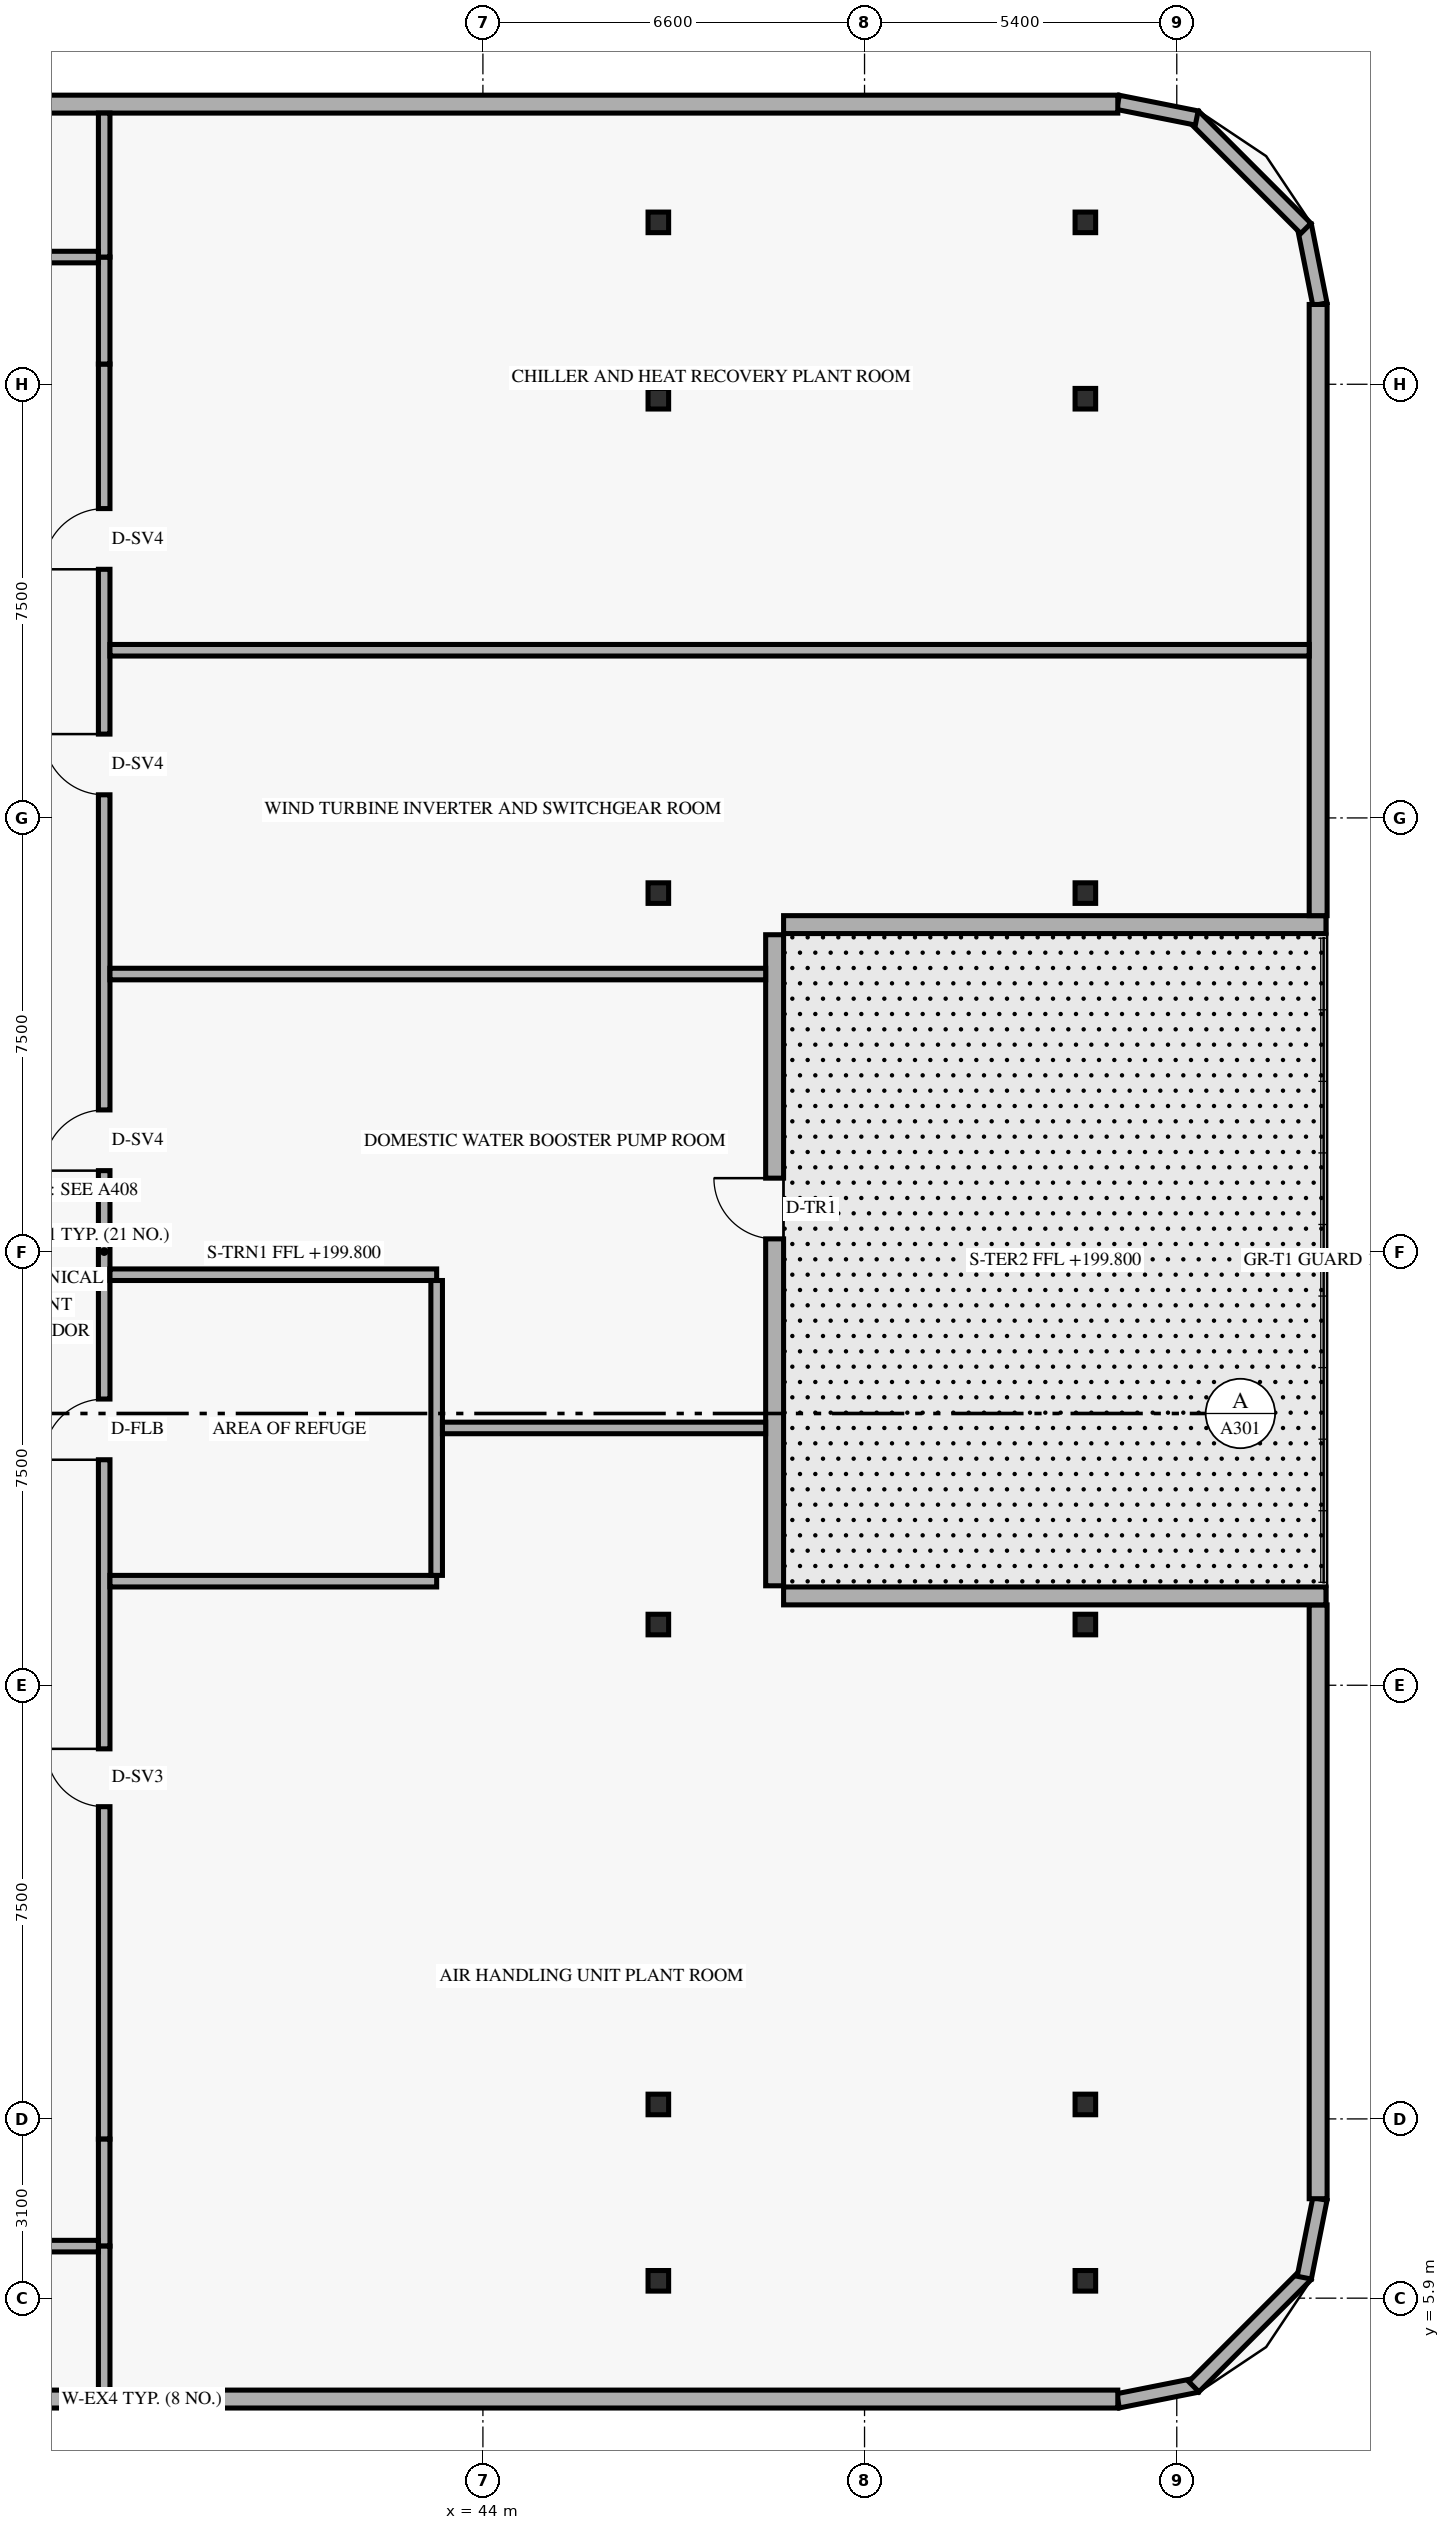
"""IFC4 building model, lengths in metres.
Left out: names, types, materials, properties, quantities, classifications, styles, units other than length and angle.
Written with IfcOpenShell. Run it as: python <this file> out.ifc"""

import sys

from ifc_helpers import new_model, si_unit, direction, frame, frame_2d, origin, origin_2d, place, context, subcontext, project, spatial, rectangle, hollow_rectangle, extrude, element, fill, save


model = new_model("IFC4")
c1 = context("Model", 3, precision=1e-05, world=origin(), true_north=direction((0.0, 1.0)))
c2 = subcontext(c1, "Body", "Model", "MODEL_VIEW")
j1 = project(units=[si_unit("LENGTHUNIT", "METRE"), si_unit("PLANEANGLEUNIT", "RADIAN")], contexts=[c1])
p1 = place(None, origin())
s1 = spatial("IfcSite", under=j1, at=p1, CompositionType="ELEMENT")
p2 = place(p1, origin())
s2 = spatial("IfcBuilding", under=s1, at=p2, CompositionType="ELEMENT")
p3 = place(p2, frame((0.0, 0.0, 199.8)))
s3 = spatial("IfcBuildingStorey", under=s2, at=p3, CompositionType="ELEMENT", Elevation=199.8)
for number, where, z_axis, x_axis in (
    (1, (46.929, 6.2, 0.0), (0.035, 0.0, 0.999), (0.0, 1.0, 0.0)),
    (2, (46.929, 9.25, 0.0), (0.035, 0.0, 0.999), (0.0, 1.0, 0.0)),
    (3, (46.929, 17.55, 0.0), (0.035, 0.0, 0.999), (0.0, 1.0, 0.0)),
    (4, (46.929, 30.2, 0.0), (0.035, 0.0, 0.999), (0.0, 1.0, 0.0)),
    (5, (46.929, 38.75, 0.0), (0.035, 0.0, 0.999), (0.0, 1.0, 0.0)),
    (6, (46.929, 41.8, 0.0), (0.035, 0.0, 0.999), (0.0, 1.0, 0.0)),
):
    element("IfcColumn", number, at=place(p3, frame(where, z_axis=z_axis, x_axis=x_axis)), inside=s3, PredefinedType="COLUMN", context=c2, shape_type="SweptSolid", body=[
        extrude(hollow_rectangle(XDim=0.356, YDim=0.356, WallThickness=0.016, at=origin_2d()), origin(), (0.0, 0.0, 1.0), 6.004),
    ])
for number, where, z_axis, x_axis in (
    (7, (54.245, 6.2, 0.0), (0.058, 0.0, 0.998), (0.0, 1.0, 0.0)),
    (8, (54.245, 9.25, 0.0), (0.058, 0.0, 0.998), (0.0, 1.0, 0.0)),
    (9, (54.245, 17.55, 0.0), (0.058, 0.0, 0.998), (0.0, 1.0, 0.0)),
    (10, (54.245, 30.2, 0.0), (0.058, 0.0, 0.998), (0.0, 1.0, 0.0)),
    (11, (54.245, 38.75, 0.0), (0.058, 0.0, 0.998), (0.0, 1.0, 0.0)),
    (12, (54.245, 41.8, 0.0), (0.058, 0.0, 0.998), (0.0, 1.0, 0.0)),
):
    element("IfcColumn", number, at=place(p3, frame(where, z_axis=z_axis, x_axis=x_axis)), inside=s3, PredefinedType="COLUMN", context=c2, shape_type="SweptSolid", body=[
        extrude(hollow_rectangle(XDim=0.356, YDim=0.356, WallThickness=0.016, at=origin_2d()), origin(), (0.0, 0.0, 1.0), 6.01),
    ])
p4 = place(p3, frame((54.983, 4.124, 0.0), z_axis=(0.0, 0.0, 1.0), x_axis=(0.980809899341, 0.19496651342, 0.0)))
e13 = element("IfcWall", 13, at=p4, inside=s3, PredefinedType="SOLIDWALL", context=c2, shape_type="SweptSolid", body=[
    extrude(rectangle(XDim=1.389, YDim=0.25, at=frame_2d((0.694, 0.0))), origin(), (0.0, 0.0, 1.0), 5.76),
])
p5 = place(p3, frame((56.295, 4.368, 0.0), z_axis=(0.0, 0.0, 1.0), x_axis=(0.707106781187, 0.707106781187, 0.0)))
e14 = element("IfcWall", 14, at=p5, inside=s3, PredefinedType="SOLIDWALL", context=c2, shape_type="SweptSolid", body=[
    extrude(rectangle(XDim=2.739, YDim=0.25, at=frame_2d((1.37, 0.0))), origin(), (0.0, 0.0, 1.0), 5.76),
])
for number, where, z_axis, x_axis in (
    (15, (58.205, 6.254, 0.0), (0.0, 0.0, 1.0), (0.195, 0.981, 0.0)),
    (16, (58.476, 40.384, 0.0), (0.0, 0.0, 1.0), (-0.195, 0.981, 0.0)),
):
    element("IfcWall", number, at=place(p3, frame(where, z_axis=z_axis, x_axis=x_axis)), inside=s3, PredefinedType="SOLIDWALL", context=c2, shape_type="SweptSolid", body=[
        extrude(rectangle(XDim=1.389, YDim=0.25, at=frame_2d((0.694, 0.0))), origin(), (0.0, 0.0, 1.0), 5.76),
    ])
p6 = place(p3, frame((58.232, 41.695, 0.0), z_axis=(0.0, 0.0, 1.0), x_axis=(-0.707106781187, 0.707106781187, 0.0)))
e17 = element("IfcWall", 17, at=p6, inside=s3, PredefinedType="SOLIDWALL", context=c2, shape_type="SweptSolid", body=[
    extrude(rectangle(XDim=2.739, YDim=0.25, at=frame_2d((1.37, 0.0))), origin(), (0.0, 0.0, 1.0), 5.76),
])
p7 = place(p3, frame((56.345, 43.605, 0.0), z_axis=(0.0, 0.0, 1.0), x_axis=(-0.980809899341, 0.19496651342, 0.0)))
e18 = element("IfcWall", 18, at=p7, inside=s3, PredefinedType="SOLIDWALL", context=c2, shape_type="SweptSolid", body=[
    extrude(rectangle(XDim=1.389, YDim=0.25, at=frame_2d((0.694, 0.0))), origin(), (0.0, 0.0, 1.0), 5.76),
])
p8 = place(p3, frame((21.22, 4.155, 0.0), z_axis=(0.0, 0.0, 1.0), x_axis=(1.0, 0.0, 0.0)))
e19 = element("IfcWall", 19, at=p8, inside=s3, PredefinedType="SOLIDWALL", context=c2, shape_type="SweptSolid", body=[
    extrude(rectangle(XDim=33.76, YDim=0.31, at=frame_2d((16.88, 0.0))), origin(), (0.0, 0.0, 1.0), 5.76),
])
p9 = place(p3, frame((58.445, 7.62, 0.0), z_axis=(0.0, 0.0, 1.0), x_axis=(0.0, 1.0, 0.0)))
e20 = element("IfcWall", 20, at=p9, inside=s3, PredefinedType="SOLIDWALL", context=c2, shape_type="SweptSolid", body=[
    extrude(rectangle(XDim=10.27, YDim=0.31, at=frame_2d((5.135, 0.0))), origin(), (0.0, 0.0, 1.0), 5.76),
])
for number, where, z_axis, x_axis in (
    (21, (49.2, 18.045, 0.0), (0.0, 0.0, 1.0), (1.0, 0.0, 0.0)),
    (22, (49.2, 29.655, 0.0), (0.0, 0.0, 1.0), (1.0, 0.0, 0.0)),
):
    element("IfcWall", number, at=place(p3, frame(where, z_axis=z_axis, x_axis=x_axis)), inside=s3, PredefinedType="SOLIDWALL", context=c2, shape_type="SweptSolid", body=[
        extrude(rectangle(XDim=9.38, YDim=0.31, at=frame_2d((4.69, 0.0))), origin(), (0.0, 0.0, 1.0), 5.279),
    ])
p10 = place(p3, frame((49.045, 18.22, 0.0), z_axis=(0.0, 0.0, 1.0), x_axis=(0.0, 1.0, 0.0)))
e23 = element("IfcWall", 23, at=p10, inside=s3, PredefinedType="SOLIDWALL", context=c2, shape_type="SweptSolid", body=[
    extrude(rectangle(XDim=11.26, YDim=0.31, at=frame_2d((5.63, 0.0))), origin(), (0.0, 0.0, 1.0), 5.76),
])
p11 = place(p10, frame((6.0, 0.0, 0.0)))
e24 = element("IfcOpeningElement", 24, at=p11, cuts=e23, PredefinedType="OPENING", context=c2, shape_type="SweptSolid", body=[
    extrude(rectangle(XDim=1.05, YDim=2.15, at=frame_2d((0.525, 1.075))), frame((0.0, 0.165, 0.0), z_axis=(0.0, -1.0, 0.0), x_axis=(1.0, 0.0, 0.0)), (0.0, 0.0, 1.0), 0.33),
])
p12 = place(p3, frame((58.445, 29.81, 0.0), z_axis=(0.0, 0.0, 1.0), x_axis=(0.0, 1.0, 0.0)))
e25 = element("IfcWall", 25, at=p12, inside=s3, PredefinedType="SOLIDWALL", context=c2, shape_type="SweptSolid", body=[
    extrude(rectangle(XDim=10.57, YDim=0.31, at=frame_2d((5.285, 0.0))), origin(), (0.0, 0.0, 1.0), 5.76),
])
p13 = place(p3, frame((54.98, 43.845, 0.0), z_axis=(0.0, 0.0, 1.0), x_axis=(-1.0, 0.0, 0.0)))
e26 = element("IfcWall", 26, at=p13, inside=s3, PredefinedType="SOLIDWALL", context=c2, shape_type="SweptSolid", body=[
    extrude(rectangle(XDim=33.76, YDim=0.31, at=frame_2d((16.88, 0.0))), origin(), (0.0, 0.0, 1.0), 5.76),
])
p14 = place(p3, frame((37.45, 8.65, 0.0), z_axis=(0.0, 0.0, 1.0), x_axis=(0.0, 1.0, 0.0)))
e27 = element("IfcWall", 27, at=p14, inside=s3, PredefinedType="STANDARD", context=c2, shape_type="SweptSolid", body=[
    extrude(rectangle(XDim=30.7, YDim=0.2, at=frame_2d((15.35, 0.0))), origin(), (0.0, 0.0, 1.0), 5.13),
])
p15 = place(p14, frame((11.75, 0.0, 0.0)))
e28 = element("IfcOpeningElement", 28, at=p15, cuts=e27, PredefinedType="OPENING", context=c2, shape_type="SweptSolid", body=[
    extrude(rectangle(XDim=1.05, YDim=2.15, at=frame_2d((0.525, 1.075))), frame((0.0, 0.11, 0.0), z_axis=(0.0, -1.0, 0.0), x_axis=(1.0, 0.0, 0.0)), (0.0, 0.0, 1.0), 0.22),
])
p16 = place(p14, frame((5.75, 0.0, 0.0)))
e29 = element("IfcOpeningElement", 29, at=p16, cuts=e27, PredefinedType="OPENING", context=c2, shape_type="SweptSolid", body=[
    extrude(rectangle(XDim=1.0, YDim=2.15, at=frame_2d((0.5, 1.075))), frame((0.0, 0.11, 0.0), z_axis=(0.0, -1.0, 0.0), x_axis=(1.0, 0.0, 0.0)), (0.0, 0.0, 1.0), 0.22),
])
p17 = place(p14, frame((16.75, 0.0, 0.0)))
e30 = element("IfcOpeningElement", 30, at=p17, cuts=e27, PredefinedType="OPENING", context=c2, shape_type="SweptSolid", body=[
    extrude(rectangle(XDim=1.05, YDim=2.15, at=frame_2d((0.525, 1.075))), frame((0.0, 0.11, 0.0), z_axis=(0.0, -1.0, 0.0), x_axis=(1.0, 0.0, 0.0)), (0.0, 0.0, 1.0), 0.22),
])
p18 = place(p14, frame((23.25, 0.0, 0.0)))
e31 = element("IfcOpeningElement", 31, at=p18, cuts=e27, PredefinedType="OPENING", context=c2, shape_type="SweptSolid", body=[
    extrude(rectangle(XDim=1.05, YDim=2.15, at=frame_2d((0.525, 1.075))), frame((0.0, 0.11, 0.0), z_axis=(0.0, -1.0, 0.0), x_axis=(1.0, 0.0, 0.0)), (0.0, 0.0, 1.0), 0.22),
])
p19 = place(p14, frame((27.15, 0.0, 0.0)))
e32 = element("IfcOpeningElement", 32, at=p19, cuts=e27, PredefinedType="OPENING", context=c2, shape_type="SweptSolid", body=[
    extrude(rectangle(XDim=1.05, YDim=2.15, at=frame_2d((0.525, 1.075))), frame((0.0, 0.11, 0.0), z_axis=(0.0, -1.0, 0.0), x_axis=(1.0, 0.0, 0.0)), (0.0, 0.0, 1.0), 0.22),
])
for number, where, z_axis, x_axis in (
    (33, (37.45, 6.8, 0.0), (0.0, 0.0, 1.0), (0.0, 1.0, 0.0)),
    (34, (37.45, 39.35, 0.0), (0.0, 0.0, 1.0), (0.0, 1.0, 0.0)),
):
    element("IfcWall", number, at=place(p3, frame(where, z_axis=z_axis, x_axis=x_axis)), inside=s3, PredefinedType="STANDARD", context=c2, shape_type="SweptSolid", body=[
        extrude(rectangle(XDim=1.85, YDim=0.2, at=frame_2d((0.925, 0.0))), origin(), (0.0, 0.0, 1.0), 5.76),
    ])
for number, where, z_axis, x_axis in (
    (35, (37.45, 4.31, 0.0), (0.0, 0.0, 1.0), (0.0, 1.0, 0.0)),
    (36, (37.45, 41.2, 0.0), (0.0, 0.0, 1.0), (0.0, 1.0, 0.0)),
):
    element("IfcWall", number, at=place(p3, frame(where, z_axis=z_axis, x_axis=x_axis)), inside=s3, PredefinedType="STANDARD", context=c2, shape_type="SweptSolid", body=[
        extrude(rectangle(XDim=2.49, YDim=0.2, at=frame_2d((1.245, 0.0))), origin(), (0.0, 0.0, 1.0), 5.279),
    ])
for number, where, z_axis, x_axis in (
    (37, (37.55, 18.3, 0.0), (0.0, 0.0, 1.0), (1.0, 0.0, 0.0)),
    (38, (37.55, 23.6, 0.0), (0.0, 0.0, 1.0), (1.0, 0.0, 0.0)),
):
    element("IfcWall", number, at=place(p3, frame(where, z_axis=z_axis, x_axis=x_axis)), inside=s3, PredefinedType="STANDARD", context=c2, shape_type="SweptSolid", body=[
        extrude(rectangle(XDim=5.65, YDim=0.2, at=frame_2d((2.825, 0.0))), origin(), (0.0, 0.0, 1.0), 5.76),
    ])
p20 = place(p3, frame((43.2, 18.4, 0.0), z_axis=(0.0, 0.0, 1.0), x_axis=(0.0, 1.0, 0.0)))
e39 = element("IfcWall", 39, at=p20, inside=s3, PredefinedType="STANDARD", context=c2, shape_type="SweptSolid", body=[
    extrude(rectangle(XDim=5.1, YDim=0.2, at=frame_2d((2.55, 0.0))), origin(), (0.0, 0.0, 1.0), 5.76),
])
p21 = place(p3, frame((43.3, 20.95, 0.0), z_axis=(0.0, 0.0, 1.0), x_axis=(1.0, 0.0, 0.0)))
e40 = element("IfcWall", 40, at=p21, inside=s3, PredefinedType="STANDARD", context=c2, shape_type="SweptSolid", body=[
    extrude(rectangle(XDim=5.59, YDim=0.2, at=frame_2d((2.795, 0.0))), origin(), (0.0, 0.0, 1.0), 5.13),
])
p22 = place(p3, frame((37.55, 28.8, 0.0), z_axis=(0.0, 0.0, 1.0), x_axis=(1.0, 0.0, 0.0)))
e41 = element("IfcWall", 41, at=p22, inside=s3, PredefinedType="STANDARD", context=c2, shape_type="SweptSolid", body=[
    extrude(rectangle(XDim=11.34, YDim=0.2, at=frame_2d((5.67, 0.0))), origin(), (0.0, 0.0, 1.0), 5.13),
])
p23 = place(p3, frame((37.55, 34.4, 0.0), z_axis=(0.0, 0.0, 1.0), x_axis=(1.0, 0.0, 0.0)))
e42 = element("IfcWall", 42, at=p23, inside=s3, PredefinedType="STANDARD", context=c2, shape_type="SweptSolid", body=[
    extrude(rectangle(XDim=20.74, YDim=0.2, at=frame_2d((10.37, 0.0))), origin(), (0.0, 0.0, 1.0), 5.13),
])
p24 = place(p3, frame((21.75, 6.8, 0.0), z_axis=(0.0, 0.0, 1.0), x_axis=(1.0, 0.0, 0.0)))
e43 = element("IfcWall", 43, at=p24, inside=s3, PredefinedType="STANDARD", context=c2, shape_type="SweptSolid", body=[
    extrude(rectangle(XDim=15.6, YDim=0.2, at=frame_2d((7.8, 0.0))), origin(), (0.0, 0.0, 1.0), 5.13),
])
p25 = place(p24, frame((5.1, 0.0, 0.0)))
e44 = element("IfcOpeningElement", 44, at=p25, cuts=e43, PredefinedType="OPENING", context=c2, shape_type="SweptSolid", body=[
    extrude(rectangle(XDim=0.9, YDim=2.1, at=frame_2d((0.45, 1.05))), frame((0.0, 0.11, 0.0), z_axis=(0.0, -1.0, 0.0), x_axis=(1.0, 0.0, 0.0)), (0.0, 0.0, 1.0), 0.22),
])
p26 = place(p3, frame((21.75, 41.2, 0.0), z_axis=(0.0, 0.0, 1.0), x_axis=(1.0, 0.0, 0.0)))
e45 = element("IfcWall", 45, at=p26, inside=s3, PredefinedType="STANDARD", context=c2, shape_type="SweptSolid", body=[
    extrude(rectangle(XDim=15.6, YDim=0.2, at=frame_2d((7.8, 0.0))), origin(), (0.0, 0.0, 1.0), 5.13),
])
p27 = place(p26, frame((5.1, 0.0, 0.0)))
e46 = element("IfcOpeningElement", 46, at=p27, cuts=e45, PredefinedType="OPENING", context=c2, shape_type="SweptSolid", body=[
    extrude(rectangle(XDim=0.9, YDim=2.1, at=frame_2d((0.45, 1.05))), frame((0.0, 0.11, 0.0), z_axis=(0.0, -1.0, 0.0), x_axis=(1.0, 0.0, 0.0)), (0.0, 0.0, 1.0), 0.22),
])
p28 = place(p11, origin())
e47 = element("IfcDoor", 47, at=p28, inside=s3, OperationType="SINGLE_SWING_RIGHT", PredefinedType="DOOR", context=c2, shape_type="SweptSolid", body=[
    extrude(rectangle(XDim=1.05, YDim=2.15, at=frame_2d((0.525, 1.075))), frame((0.0, 0.025, 0.0), z_axis=(0.0, -1.0, 0.0), x_axis=(1.0, 0.0, 0.0)), (0.0, 0.0, 1.0), 0.05),
])
fill(e24, e47)
p29 = place(p15, origin())
e48 = element("IfcDoor", 48, at=p29, inside=s3, OperationType="SINGLE_SWING_LEFT", PredefinedType="DOOR", context=c2, shape_type="SweptSolid", body=[
    extrude(rectangle(XDim=1.05, YDim=2.15, at=frame_2d((0.525, 1.075))), frame((0.0, 0.025, 0.0), z_axis=(0.0, -1.0, 0.0), x_axis=(1.0, 0.0, 0.0)), (0.0, 0.0, 1.0), 0.05),
])
fill(e28, e48)
p30 = place(p16, origin())
e49 = element("IfcDoor", 49, at=p30, inside=s3, OperationType="SINGLE_SWING_RIGHT", PredefinedType="DOOR", context=c2, shape_type="SweptSolid", body=[
    extrude(rectangle(XDim=1.0, YDim=2.15, at=frame_2d((0.5, 1.075))), frame((0.0, 0.025, 0.0), z_axis=(0.0, -1.0, 0.0), x_axis=(1.0, 0.0, 0.0)), (0.0, 0.0, 1.0), 0.05),
])
fill(e29, e49)
p31 = place(p17, origin())
e50 = element("IfcDoor", 50, at=p31, inside=s3, OperationType="SINGLE_SWING_LEFT", PredefinedType="DOOR", context=c2, shape_type="SweptSolid", body=[
    extrude(rectangle(XDim=1.05, YDim=2.15, at=frame_2d((0.525, 1.075))), frame((0.0, 0.025, 0.0), z_axis=(0.0, -1.0, 0.0), x_axis=(1.0, 0.0, 0.0)), (0.0, 0.0, 1.0), 0.05),
])
fill(e30, e50)
p32 = place(p18, origin())
e51 = element("IfcDoor", 51, at=p32, inside=s3, OperationType="SINGLE_SWING_RIGHT", PredefinedType="DOOR", context=c2, shape_type="SweptSolid", body=[
    extrude(rectangle(XDim=1.05, YDim=2.15, at=frame_2d((0.525, 1.075))), frame((0.0, 0.025, 0.0), z_axis=(0.0, -1.0, 0.0), x_axis=(1.0, 0.0, 0.0)), (0.0, 0.0, 1.0), 0.05),
])
fill(e31, e51)
p33 = place(p19, origin())
e52 = element("IfcDoor", 52, at=p33, inside=s3, OperationType="SINGLE_SWING_LEFT", PredefinedType="DOOR", context=c2, shape_type="SweptSolid", body=[
    extrude(rectangle(XDim=1.05, YDim=2.15, at=frame_2d((0.525, 1.075))), frame((0.0, 0.025, 0.0), z_axis=(0.0, -1.0, 0.0), x_axis=(1.0, 0.0, 0.0)), (0.0, 0.0, 1.0), 0.05),
])
fill(e32, e52)
save(model, sys.argv[1])
